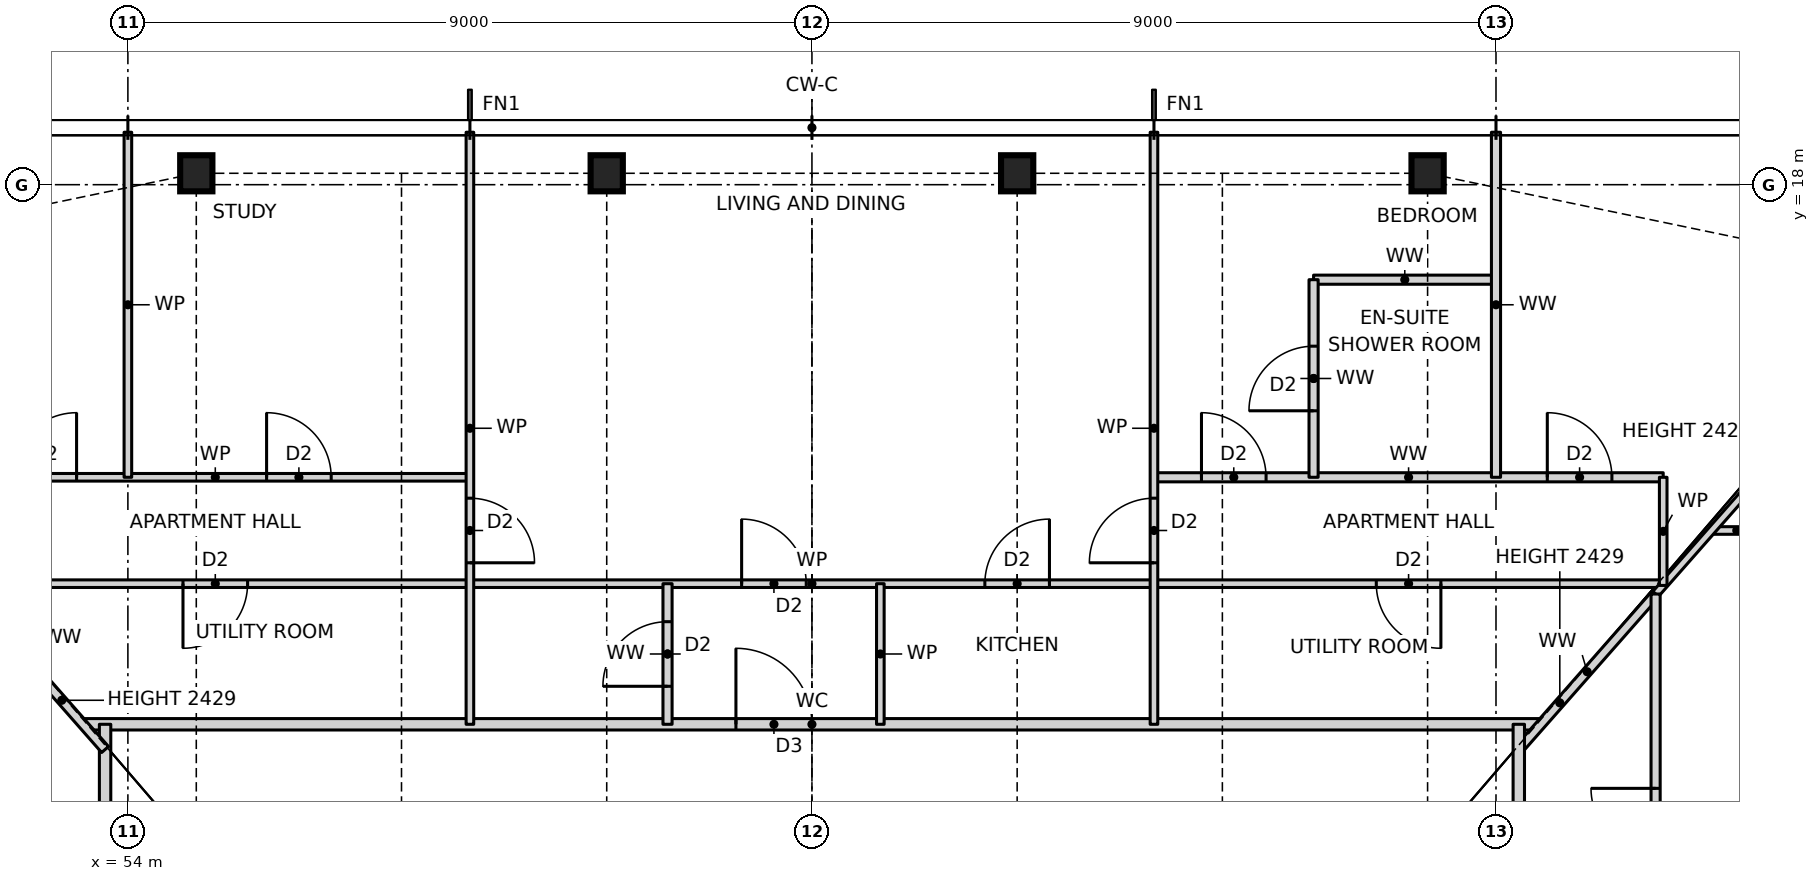
"""IFC4 building model, lengths in metres.
Left out: names, types, materials, properties, quantities, classifications, styles, units other than length and angle.
Written with IfcOpenShell. Run it as: python <this file> out.ifc"""

import sys

from ifc_helpers import new_model, si_unit, direction, frame, frame_2d, origin, origin_2d, place, context, subcontext, project, spatial, rectangle, i_section, extrude, element, fill, save


model = new_model("IFC4")
c1 = context("Model", 3, precision=1e-05, world=origin(), true_north=direction((0.0, 1.0)))
c2 = subcontext(c1, "Body", "Model", "MODEL_VIEW")
j1 = project(units=[si_unit("LENGTHUNIT", "METRE"), si_unit("PLANEANGLEUNIT", "RADIAN")], contexts=[c1])
p1 = place(None, origin())
s1 = spatial("IfcSite", under=j1, at=p1, CompositionType="ELEMENT")
p2 = place(p1, origin())
s2 = spatial("IfcBuilding", under=s1, at=p2, CompositionType="ELEMENT")
p3 = place(p2, frame((0.0, 0.0, 43.0)))
s3 = spatial("IfcBuildingStorey", under=s2, at=p3, CompositionType="ELEMENT", Elevation=43.0)
for number, where, z_axis, x_axis in (
    (1, (71.1, 18.15, 0.0), (0.0, 0.0, 1.0), (1.0, 0.0, 0.0)),
    (2, (65.7, 18.15, 0.0), (0.0, 0.0, 1.0), (1.0, 0.0, 0.0)),
    (3, (60.3, 18.15, 0.0), (0.0, 0.0, 1.0), (1.0, 0.0, 0.0)),
    (4, (54.9, 18.15, 0.0), (0.0, 0.0, 1.0), (1.0, 0.0, 0.0)),
):
    element("IfcColumn", number, at=place(p3, frame(where, z_axis=z_axis, x_axis=x_axis)), inside=s3, PredefinedType="COLUMN", context=c2, shape_type="SweptSolid", body=[
        extrude(i_section(OverallWidth=0.424, OverallDepth=0.475, WebThickness=0.048, FlangeThickness=0.077, at=origin_2d()), origin(), (0.0, 0.0, 1.0), 3.5),
    ])
p4 = place(p3, frame((53.408, 10.9, 0.0), z_axis=(0.0, 0.0, 1.0), x_axis=(1.0, 0.0, 0.0)))
e5 = element("IfcWall", 5, at=p4, inside=s3, PredefinedType="PARTITIONING", context=c2, shape_type="SweptSolid", body=[
    extrude(rectangle(XDim=19.184, YDim=0.15, at=frame_2d((9.592, 0.0))), origin(), (0.0, 0.0, 1.0), 3.27),
])
p5 = place(p4, frame((8.592, 0.0, 0.0)))
e6 = element("IfcOpeningElement", 6, at=p5, cuts=e5, PredefinedType="OPENING", context=c2, shape_type="SweptSolid", body=[
    extrude(rectangle(XDim=1.0, YDim=2.1, at=frame_2d((0.5, 1.05))), frame((0.0, 0.085, 0.0), z_axis=(0.0, -1.0, 0.0), x_axis=(1.0, 0.0, 0.0)), (0.0, 0.0, 1.0), 0.17),
])
p6 = place(p3, frame((51.8, 12.75, 0.0), z_axis=(0.0, 0.0, 1.0), x_axis=(1.0, 0.0, 0.0)))
e7 = element("IfcWall", 7, at=p6, inside=s3, PredefinedType="PARTITIONING", context=c2, shape_type="SweptSolid", body=[
    extrude(rectangle(XDim=22.4, YDim=0.1, at=frame_2d((11.2, 0.0))), origin(), (0.0, 0.0, 1.0), 3.27),
])
p7 = place(p6, frame((13.475, 0.0, 0.0)))
e8 = element("IfcOpeningElement", 8, at=p7, cuts=e7, PredefinedType="OPENING", context=c2, shape_type="SweptSolid", body=[
    extrude(rectangle(XDim=0.85, YDim=2.1, at=frame_2d((0.425, 1.05))), frame((0.0, 0.06, 0.0), z_axis=(0.0, -1.0, 0.0), x_axis=(1.0, 0.0, 0.0)), (0.0, 0.0, 1.0), 0.12),
])
p8 = place(p6, frame((10.275, 0.0, 0.0)))
e9 = element("IfcOpeningElement", 9, at=p8, cuts=e7, PredefinedType="OPENING", context=c2, shape_type="SweptSolid", body=[
    extrude(rectangle(XDim=0.85, YDim=2.1, at=frame_2d((0.425, 1.05))), frame((0.0, 0.06, 0.0), z_axis=(0.0, -1.0, 0.0), x_axis=(1.0, 0.0, 0.0)), (0.0, 0.0, 1.0), 0.12),
])
p9 = place(p6, frame((18.625, 0.0, 0.0)))
e10 = element("IfcOpeningElement", 10, at=p9, cuts=e7, PredefinedType="OPENING", context=c2, shape_type="SweptSolid", body=[
    extrude(rectangle(XDim=0.85, YDim=2.1, at=frame_2d((0.425, 1.05))), frame((0.0, 0.06, 0.0), z_axis=(0.0, -1.0, 0.0), x_axis=(1.0, 0.0, 0.0)), (0.0, 0.0, 1.0), 0.12),
])
p10 = place(p6, frame((2.925, 0.0, 0.0)))
e11 = element("IfcOpeningElement", 11, at=p10, cuts=e7, PredefinedType="OPENING", context=c2, shape_type="SweptSolid", body=[
    extrude(rectangle(XDim=0.85, YDim=2.1, at=frame_2d((0.425, 1.05))), frame((0.0, 0.06, 0.0), z_axis=(0.0, -1.0, 0.0), x_axis=(1.0, 0.0, 0.0)), (0.0, 0.0, 1.0), 0.12),
])
p11 = place(p3, frame((74.836, 13.45, 0.0), z_axis=(0.0, 0.0, 1.0), x_axis=(1.0, 0.0, 0.0)))
e12 = element("IfcWall", 12, at=p11, inside=s3, PredefinedType="PARTITIONING", context=c2, shape_type="SweptSolid", body=[
    extrude(rectangle(XDim=0.664, YDim=0.1, at=frame_2d((0.332, 0.0))), origin(), (0.0, 0.0, 1.0), 3.27),
])
p12 = place(p3, frame((51.8, 14.15, 0.0), z_axis=(0.0, 0.0, 1.0), x_axis=(1.0, 0.0, 0.0)))
e13 = element("IfcWall", 13, at=p12, inside=s3, PredefinedType="PARTITIONING", context=c2, shape_type="SweptSolid", body=[
    extrude(rectangle(XDim=6.7, YDim=0.1, at=frame_2d((3.35, 0.0))), origin(), (0.0, 0.0, 1.0), 3.27),
])
p13 = place(p12, frame((4.025, 0.0, 0.0)))
e14 = element("IfcOpeningElement", 14, at=p13, cuts=e13, PredefinedType="OPENING", context=c2, shape_type="SweptSolid", body=[
    extrude(rectangle(XDim=0.85, YDim=2.1, at=frame_2d((0.425, 1.05))), frame((0.0, 0.06, 0.0), z_axis=(0.0, -1.0, 0.0), x_axis=(1.0, 0.0, 0.0)), (0.0, 0.0, 1.0), 0.12),
])
p14 = place(p12, frame((0.675, 0.0, 0.0)))
e15 = element("IfcOpeningElement", 15, at=p14, cuts=e13, PredefinedType="OPENING", context=c2, shape_type="SweptSolid", body=[
    extrude(rectangle(XDim=0.85, YDim=2.1, at=frame_2d((0.425, 1.05))), frame((0.0, 0.06, 0.0), z_axis=(0.0, -1.0, 0.0), x_axis=(1.0, 0.0, 0.0)), (0.0, 0.0, 1.0), 0.12),
])
p15 = place(p3, frame((67.5, 14.15, 0.0), z_axis=(0.0, 0.0, 1.0), x_axis=(1.0, 0.0, 0.0)))
e16 = element("IfcWall", 16, at=p15, inside=s3, PredefinedType="PARTITIONING", context=c2, shape_type="SweptSolid", body=[
    extrude(rectangle(XDim=6.7, YDim=0.12, at=frame_2d((3.35, 0.0))), origin(), (0.0, 0.0, 1.0), 3.27),
])
p16 = place(p15, frame((0.625, 0.0, 0.0)))
e17 = element("IfcOpeningElement", 17, at=p16, cuts=e16, PredefinedType="OPENING", context=c2, shape_type="SweptSolid", body=[
    extrude(rectangle(XDim=0.85, YDim=2.1, at=frame_2d((0.425, 1.05))), frame((0.0, 0.07, 0.0), z_axis=(0.0, -1.0, 0.0), x_axis=(1.0, 0.0, 0.0)), (0.0, 0.0, 1.0), 0.14),
])
p17 = place(p15, frame((5.175, 0.0, 0.0)))
e18 = element("IfcOpeningElement", 18, at=p17, cuts=e16, PredefinedType="OPENING", context=c2, shape_type="SweptSolid", body=[
    extrude(rectangle(XDim=0.85, YDim=2.1, at=frame_2d((0.425, 1.05))), frame((0.0, 0.07, 0.0), z_axis=(0.0, -1.0, 0.0), x_axis=(1.0, 0.0, 0.0)), (0.0, 0.0, 1.0), 0.14),
])
p18 = place(p3, frame((69.6, 16.75, 0.0), z_axis=(0.0, 0.0, 1.0), x_axis=(1.0, 0.0, 0.0)))
e19 = element("IfcWall", 19, at=p18, inside=s3, PredefinedType="PARTITIONING", context=c2, shape_type="SweptSolid", body=[
    extrude(rectangle(XDim=2.4, YDim=0.12, at=frame_2d((1.2, 0.0))), origin(), (0.0, 0.0, 1.0), 3.27),
])
p19 = place(p3, frame((74.1, 12.614, 0.0), z_axis=(0.0, 0.0, 1.0), x_axis=(0.660755619739, 0.750601099775, 0.0)))
e20 = element("IfcWall", 20, at=p19, inside=s3, PredefinedType="PARTITIONING", context=c2, shape_type="SweptSolid", body=[
    extrude(rectangle(XDim=5.989, YDim=0.1, at=frame_2d((2.995, 0.0))), origin(), (0.0, 0.0, 1.0), 2.429),
])
p20 = place(p3, frame((72.299, 10.569, 0.0), z_axis=(0.0, 0.0, 1.0), x_axis=(0.660797520752, 0.750564212155, 0.0)))
e21 = element("IfcWall", 21, at=p20, inside=s3, PredefinedType="PARTITIONING", context=c2, shape_type="SweptSolid", body=[
    extrude(rectangle(XDim=2.725, YDim=0.12, at=frame_2d((1.363, 0.0))), origin(), (0.0, 0.0, 1.0), 2.429),
])
p21 = place(p3, frame((74.2, 12.727, 0.0), z_axis=(0.0, 0.0, 1.0), x_axis=(0.0, 1.0, 0.0)))
e22 = element("IfcWall", 22, at=p21, inside=s3, PredefinedType="PARTITIONING", context=c2, shape_type="SweptSolid", body=[
    extrude(rectangle(XDim=1.423, YDim=0.1, at=frame_2d((0.711, 0.0))), origin(), (0.0, 0.0, 1.0), 3.27),
])
p22 = place(p3, frame((74.1, -12.614, 0.0), z_axis=(0.0, 0.0, 1.0), x_axis=(0.0, 1.0, 0.0)))
e23 = element("IfcWall", 23, at=p22, inside=s3, PredefinedType="PARTITIONING", context=c2, shape_type="SweptSolid", body=[
    extrude(rectangle(XDim=25.228, YDim=0.12, at=frame_2d((12.614, 0.0))), origin(), (0.0, 0.0, 1.0), 3.27),
])
p23 = place(p22, frame((7.239, 0.0, 0.0)))
e24 = element("IfcOpeningElement", 24, at=p23, cuts=e23, PredefinedType="OPENING", context=c2, shape_type="SweptSolid", body=[
    extrude(rectangle(XDim=0.85, YDim=2.1, at=frame_2d((0.425, 1.05))), frame((0.0, 0.07, 0.0), z_axis=(0.0, -1.0, 0.0), x_axis=(1.0, 0.0, 0.0)), (0.0, 0.0, 1.0), 0.14),
])
p24 = place(p22, frame((10.439, 0.0, 0.0)))
e25 = element("IfcOpeningElement", 25, at=p24, cuts=e23, PredefinedType="OPENING", context=c2, shape_type="SweptSolid", body=[
    extrude(rectangle(XDim=0.85, YDim=2.1, at=frame_2d((0.425, 1.05))), frame((0.0, 0.07, 0.0), z_axis=(0.0, -1.0, 0.0), x_axis=(1.0, 0.0, 0.0)), (0.0, 0.0, 1.0), 0.14),
])
p25 = place(p22, frame((2.507, 0.0, 0.0)))
e26 = element("IfcOpeningElement", 26, at=p25, cuts=e23, PredefinedType="OPENING", context=c2, shape_type="SweptSolid", body=[
    extrude(rectangle(XDim=0.85, YDim=2.1, at=frame_2d((0.425, 1.05))), frame((0.0, 0.07, 0.0), z_axis=(0.0, -1.0, 0.0), x_axis=(1.0, 0.0, 0.0)), (0.0, 0.0, 1.0), 0.14),
])
p26 = place(p22, frame((16.639, 0.0, 0.0)))
e27 = element("IfcOpeningElement", 27, at=p26, cuts=e23, PredefinedType="OPENING", context=c2, shape_type="SweptSolid", body=[
    extrude(rectangle(XDim=0.85, YDim=2.1, at=frame_2d((0.425, 1.05))), frame((0.0, 0.07, 0.0), z_axis=(0.0, -1.0, 0.0), x_axis=(1.0, 0.0, 0.0)), (0.0, 0.0, 1.0), 0.14),
])
p27 = place(p22, frame((21.821, 0.0, 0.0)))
e28 = element("IfcOpeningElement", 28, at=p27, cuts=e23, PredefinedType="OPENING", context=c2, shape_type="SweptSolid", body=[
    extrude(rectangle(XDim=0.85, YDim=2.1, at=frame_2d((0.425, 1.05))), frame((0.0, 0.07, 0.0), z_axis=(0.0, -1.0, 0.0), x_axis=(1.0, 0.0, 0.0)), (0.0, 0.0, 1.0), 0.14),
])
p28 = place(p3, frame((72.3, -10.568, 0.0), z_axis=(0.0, 0.0, 1.0), x_axis=(0.0, 1.0, 0.0)))
e29 = element("IfcWall", 29, at=p28, inside=s3, PredefinedType="PARTITIONING", context=c2, shape_type="SweptSolid", body=[
    extrude(rectangle(XDim=21.468, YDim=0.15, at=frame_2d((10.734, 0.0))), origin(), (0.0, 0.0, 1.0), 3.27),
])
p29 = place(p28, frame((8.318, 0.0, 0.0)))
e30 = element("IfcOpeningElement", 30, at=p29, cuts=e29, PredefinedType="OPENING", context=c2, shape_type="SweptSolid", body=[
    extrude(rectangle(XDim=1.0, YDim=2.1, at=frame_2d((0.5, 1.05))), frame((0.0, 0.085, 0.0), z_axis=(0.0, -1.0, 0.0), x_axis=(1.0, 0.0, 0.0)), (0.0, 0.0, 1.0), 0.17),
])
p30 = place(p3, frame((72.0, 14.15, 0.0), z_axis=(0.0, 0.0, 1.0), x_axis=(0.0, 1.0, 0.0)))
e31 = element("IfcWall", 31, at=p30, inside=s3, PredefinedType="PARTITIONING", context=c2, shape_type="SweptSolid", body=[
    extrude(rectangle(XDim=4.54, YDim=0.12, at=frame_2d((2.27, 0.0))), origin(), (0.0, 0.0, 1.0), 3.27),
])
p31 = place(p3, frame((69.6, 14.15, 0.0), z_axis=(0.0, 0.0, 1.0), x_axis=(0.0, 1.0, 0.0)))
e32 = element("IfcWall", 32, at=p31, inside=s3, PredefinedType="PARTITIONING", context=c2, shape_type="SweptSolid", body=[
    extrude(rectangle(XDim=2.6, YDim=0.12, at=frame_2d((1.3, 0.0))), origin(), (0.0, 0.0, 1.0), 3.27),
])
p32 = place(p31, frame((0.875, 0.0, 0.0)))
e33 = element("IfcOpeningElement", 33, at=p32, cuts=e32, PredefinedType="OPENING", context=c2, shape_type="SweptSolid", body=[
    extrude(rectangle(XDim=0.85, YDim=2.1, at=frame_2d((0.425, 1.05))), frame((0.0, 0.07, 0.0), z_axis=(0.0, -1.0, 0.0), x_axis=(1.0, 0.0, 0.0)), (0.0, 0.0, 1.0), 0.14),
])
p33 = place(p3, frame((67.5, 10.9, 0.0), z_axis=(0.0, 0.0, 1.0), x_axis=(0.0, 1.0, 0.0)))
e34 = element("IfcWall", 34, at=p33, inside=s3, PredefinedType="PARTITIONING", context=c2, shape_type="SweptSolid", body=[
    extrude(rectangle(XDim=7.79, YDim=0.1, at=frame_2d((3.895, 0.0))), origin(), (0.0, 0.0, 1.0), 3.27),
])
p34 = place(p33, frame((2.125, 0.0, 0.0)))
e35 = element("IfcOpeningElement", 35, at=p34, cuts=e34, PredefinedType="OPENING", context=c2, shape_type="SweptSolid", body=[
    extrude(rectangle(XDim=0.85, YDim=2.1, at=frame_2d((0.425, 1.05))), frame((0.0, 0.06, 0.0), z_axis=(0.0, -1.0, 0.0), x_axis=(1.0, 0.0, 0.0)), (0.0, 0.0, 1.0), 0.12),
])
p35 = place(p3, frame((63.9, 10.9, 0.0), z_axis=(0.0, 0.0, 1.0), x_axis=(0.0, 1.0, 0.0)))
e36 = element("IfcWall", 36, at=p35, inside=s3, PredefinedType="PARTITIONING", context=c2, shape_type="SweptSolid", body=[
    extrude(rectangle(XDim=1.85, YDim=0.1, at=frame_2d((0.925, 0.0))), origin(), (0.0, 0.0, 1.0), 3.27),
])
p36 = place(p3, frame((61.1, 10.9, 0.0), z_axis=(0.0, 0.0, 1.0), x_axis=(0.0, 1.0, 0.0)))
e37 = element("IfcWall", 37, at=p36, inside=s3, PredefinedType="PARTITIONING", context=c2, shape_type="SweptSolid", body=[
    extrude(rectangle(XDim=1.85, YDim=0.12, at=frame_2d((0.925, 0.0))), origin(), (0.0, 0.0, 1.0), 3.27),
])
p37 = place(p36, frame((0.5, 0.0, 0.0)))
e38 = element("IfcOpeningElement", 38, at=p37, cuts=e37, PredefinedType="OPENING", context=c2, shape_type="SweptSolid", body=[
    extrude(rectangle(XDim=0.85, YDim=2.1, at=frame_2d((0.425, 1.05))), frame((0.0, 0.07, 0.0), z_axis=(0.0, -1.0, 0.0), x_axis=(1.0, 0.0, 0.0)), (0.0, 0.0, 1.0), 0.14),
])
p38 = place(p3, frame((58.5, 10.9, 0.0), z_axis=(0.0, 0.0, 1.0), x_axis=(0.0, 1.0, 0.0)))
e39 = element("IfcWall", 39, at=p38, inside=s3, PredefinedType="PARTITIONING", context=c2, shape_type="SweptSolid", body=[
    extrude(rectangle(XDim=7.79, YDim=0.1, at=frame_2d((3.895, 0.0))), origin(), (0.0, 0.0, 1.0), 3.27),
])
p39 = place(p38, frame((2.125, 0.0, 0.0)))
e40 = element("IfcOpeningElement", 40, at=p39, cuts=e39, PredefinedType="OPENING", context=c2, shape_type="SweptSolid", body=[
    extrude(rectangle(XDim=0.85, YDim=2.1, at=frame_2d((0.425, 1.05))), frame((0.0, 0.06, 0.0), z_axis=(0.0, -1.0, 0.0), x_axis=(1.0, 0.0, 0.0)), (0.0, 0.0, 1.0), 0.12),
])
p40 = place(p3, frame((54.0, 14.15, 0.0), z_axis=(0.0, 0.0, 1.0), x_axis=(0.0, 1.0, 0.0)))
e41 = element("IfcWall", 41, at=p40, inside=s3, PredefinedType="PARTITIONING", context=c2, shape_type="SweptSolid", body=[
    extrude(rectangle(XDim=4.54, YDim=0.1, at=frame_2d((2.27, 0.0))), origin(), (0.0, 0.0, 1.0), 3.27),
])
p41 = place(p3, frame((53.7, -10.568, 0.0), z_axis=(0.0, 0.0, 1.0), x_axis=(0.0, 1.0, 0.0)))
e42 = element("IfcWall", 42, at=p41, inside=s3, PredefinedType="PARTITIONING", context=c2, shape_type="SweptSolid", body=[
    extrude(rectangle(XDim=21.468, YDim=0.15, at=frame_2d((10.734, 0.0))), origin(), (0.0, 0.0, 1.0), 3.27),
])
p42 = place(p41, frame((11.818, 0.0, 0.0)))
e43 = element("IfcOpeningElement", 43, at=p42, cuts=e42, PredefinedType="OPENING", context=c2, shape_type="SweptSolid", body=[
    extrude(rectangle(XDim=1.0, YDim=2.1, at=frame_2d((0.5, 1.05))), frame((0.0, 0.085, 0.0), z_axis=(0.0, -1.0, 0.0), x_axis=(1.0, 0.0, 0.0)), (0.0, 0.0, 1.0), 0.17),
])
p43 = place(p3, frame((53.7, 10.568, 0.0), z_axis=(0.0, 0.0, 1.0), x_axis=(-0.660275707921, 0.751023294931, 0.0)))
e44 = element("IfcWall", 44, at=p43, inside=s3, PredefinedType="PARTITIONING", context=c2, shape_type="SweptSolid", body=[
    extrude(rectangle(XDim=2.876, YDim=0.12, at=frame_2d((1.438, 0.0))), origin(), (0.0, 0.0, 1.0), 2.429),
])
p44 = place(p27, origin())
e45 = element("IfcDoor", 45, at=p44, inside=s3, OperationType="SINGLE_SWING_RIGHT", PredefinedType="DOOR", context=c2, shape_type="SweptSolid", body=[
    extrude(rectangle(XDim=0.85, YDim=2.1, at=frame_2d((0.425, 1.05))), frame((0.0, 0.025, 0.0), z_axis=(0.0, -1.0, 0.0), x_axis=(1.0, 0.0, 0.0)), (0.0, 0.0, 1.0), 0.05),
])
fill(e28, e45)
p45 = place(p7, origin())
e46 = element("IfcDoor", 46, at=p45, inside=s3, OperationType="SINGLE_SWING_RIGHT", PredefinedType="DOOR", context=c2, shape_type="SweptSolid", body=[
    extrude(rectangle(XDim=0.85, YDim=2.1, at=frame_2d((0.425, 1.05))), frame((0.0, 0.025, 0.0), z_axis=(0.0, -1.0, 0.0), x_axis=(1.0, 0.0, 0.0)), (0.0, 0.0, 1.0), 0.05),
])
fill(e8, e46)
p46 = place(p5, origin())
e47 = element("IfcDoor", 47, at=p46, inside=s3, OperationType="SINGLE_SWING_LEFT", PredefinedType="DOOR", context=c2, shape_type="SweptSolid", body=[
    extrude(rectangle(XDim=1.0, YDim=2.1, at=frame_2d((0.5, 1.05))), frame((0.0, 0.025, 0.0), z_axis=(0.0, -1.0, 0.0), x_axis=(1.0, 0.0, 0.0)), (0.0, 0.0, 1.0), 0.05),
])
fill(e6, e47)
p47 = place(p8, origin())
e48 = element("IfcDoor", 48, at=p47, inside=s3, OperationType="SINGLE_SWING_LEFT", PredefinedType="DOOR", context=c2, shape_type="SweptSolid", body=[
    extrude(rectangle(XDim=0.85, YDim=2.1, at=frame_2d((0.425, 1.05))), frame((0.0, 0.025, 0.0), z_axis=(0.0, -1.0, 0.0), x_axis=(1.0, 0.0, 0.0)), (0.0, 0.0, 1.0), 0.05),
])
fill(e9, e48)
p48 = place(p37, origin())
e49 = element("IfcDoor", 49, at=p48, inside=s3, OperationType="SINGLE_SWING_LEFT", PredefinedType="DOOR", context=c2, shape_type="SweptSolid", body=[
    extrude(rectangle(XDim=0.85, YDim=2.1, at=frame_2d((0.425, 1.05))), frame((0.0, 0.025, 0.0), z_axis=(0.0, -1.0, 0.0), x_axis=(1.0, 0.0, 0.0)), (0.0, 0.0, 1.0), 0.05),
])
fill(e38, e49)
p49 = place(p34, origin())
e50 = element("IfcDoor", 50, at=p49, inside=s3, OperationType="SINGLE_SWING_LEFT", PredefinedType="DOOR", context=c2, shape_type="SweptSolid", body=[
    extrude(rectangle(XDim=0.85, YDim=2.1, at=frame_2d((0.425, 1.05))), frame((0.0, 0.025, 0.0), z_axis=(0.0, -1.0, 0.0), x_axis=(1.0, 0.0, 0.0)), (0.0, 0.0, 1.0), 0.05),
])
fill(e35, e50)
p50 = place(p32, origin())
e51 = element("IfcDoor", 51, at=p50, inside=s3, OperationType="SINGLE_SWING_LEFT", PredefinedType="DOOR", context=c2, shape_type="SweptSolid", body=[
    extrude(rectangle(XDim=0.85, YDim=2.1, at=frame_2d((0.425, 1.05))), frame((0.0, 0.025, 0.0), z_axis=(0.0, -1.0, 0.0), x_axis=(1.0, 0.0, 0.0)), (0.0, 0.0, 1.0), 0.05),
])
fill(e33, e51)
p51 = place(p16, origin())
e52 = element("IfcDoor", 52, at=p51, inside=s3, OperationType="SINGLE_SWING_LEFT", PredefinedType="DOOR", context=c2, shape_type="SweptSolid", body=[
    extrude(rectangle(XDim=0.85, YDim=2.1, at=frame_2d((0.425, 1.05))), frame((0.0, 0.025, 0.0), z_axis=(0.0, -1.0, 0.0), x_axis=(1.0, 0.0, 0.0)), (0.0, 0.0, 1.0), 0.05),
])
fill(e17, e52)
p52 = place(p17, origin())
e53 = element("IfcDoor", 53, at=p52, inside=s3, OperationType="SINGLE_SWING_LEFT", PredefinedType="DOOR", context=c2, shape_type="SweptSolid", body=[
    extrude(rectangle(XDim=0.85, YDim=2.1, at=frame_2d((0.425, 1.05))), frame((0.0, 0.025, 0.0), z_axis=(0.0, -1.0, 0.0), x_axis=(1.0, 0.0, 0.0)), (0.0, 0.0, 1.0), 0.05),
])
fill(e18, e53)
p53 = place(p9, frame((0.85, 0.0, 0.0), z_axis=(0.0, 0.0, 1.0), x_axis=(-1.0, 0.0, 0.0)))
e54 = element("IfcDoor", 54, at=p53, inside=s3, OperationType="SINGLE_SWING_LEFT", PredefinedType="DOOR", context=c2, shape_type="SweptSolid", body=[
    extrude(rectangle(XDim=0.85, YDim=2.1, at=frame_2d((0.425, 1.05))), frame((0.0, 0.025, 0.0), z_axis=(0.0, -1.0, 0.0), x_axis=(1.0, 0.0, 0.0)), (0.0, 0.0, 1.0), 0.05),
])
fill(e10, e54)
p54 = place(p39, frame((0.85, 0.0, 0.0), z_axis=(0.0, 0.0, 1.0), x_axis=(-1.0, 0.0, 0.0)))
e55 = element("IfcDoor", 55, at=p54, inside=s3, OperationType="SINGLE_SWING_RIGHT", PredefinedType="DOOR", context=c2, shape_type="SweptSolid", body=[
    extrude(rectangle(XDim=0.85, YDim=2.1, at=frame_2d((0.425, 1.05))), frame((0.0, 0.025, 0.0), z_axis=(0.0, -1.0, 0.0), x_axis=(1.0, 0.0, 0.0)), (0.0, 0.0, 1.0), 0.05),
])
fill(e40, e55)
p55 = place(p13, origin())
e56 = element("IfcDoor", 56, at=p55, inside=s3, OperationType="SINGLE_SWING_LEFT", PredefinedType="DOOR", context=c2, shape_type="SweptSolid", body=[
    extrude(rectangle(XDim=0.85, YDim=2.1, at=frame_2d((0.425, 1.05))), frame((0.0, 0.025, 0.0), z_axis=(0.0, -1.0, 0.0), x_axis=(1.0, 0.0, 0.0)), (0.0, 0.0, 1.0), 0.05),
])
fill(e14, e56)
p56 = place(p14, origin())
e57 = element("IfcDoor", 57, at=p56, inside=s3, OperationType="SINGLE_SWING_RIGHT", PredefinedType="DOOR", context=c2, shape_type="SweptSolid", body=[
    extrude(rectangle(XDim=0.85, YDim=2.1, at=frame_2d((0.425, 1.05))), frame((0.0, 0.025, 0.0), z_axis=(0.0, -1.0, 0.0), x_axis=(1.0, 0.0, 0.0)), (0.0, 0.0, 1.0), 0.05),
])
fill(e15, e57)
p57 = place(p10, frame((0.85, 0.0, 0.0), z_axis=(0.0, 0.0, 1.0), x_axis=(-1.0, 0.0, 0.0)))
e58 = element("IfcDoor", 58, at=p57, inside=s3, OperationType="SINGLE_SWING_RIGHT", PredefinedType="DOOR", context=c2, shape_type="SweptSolid", body=[
    extrude(rectangle(XDim=0.85, YDim=2.1, at=frame_2d((0.425, 1.05))), frame((0.0, 0.025, 0.0), z_axis=(0.0, -1.0, 0.0), x_axis=(1.0, 0.0, 0.0)), (0.0, 0.0, 1.0), 0.05),
])
fill(e11, e58)
save(model, sys.argv[1])
